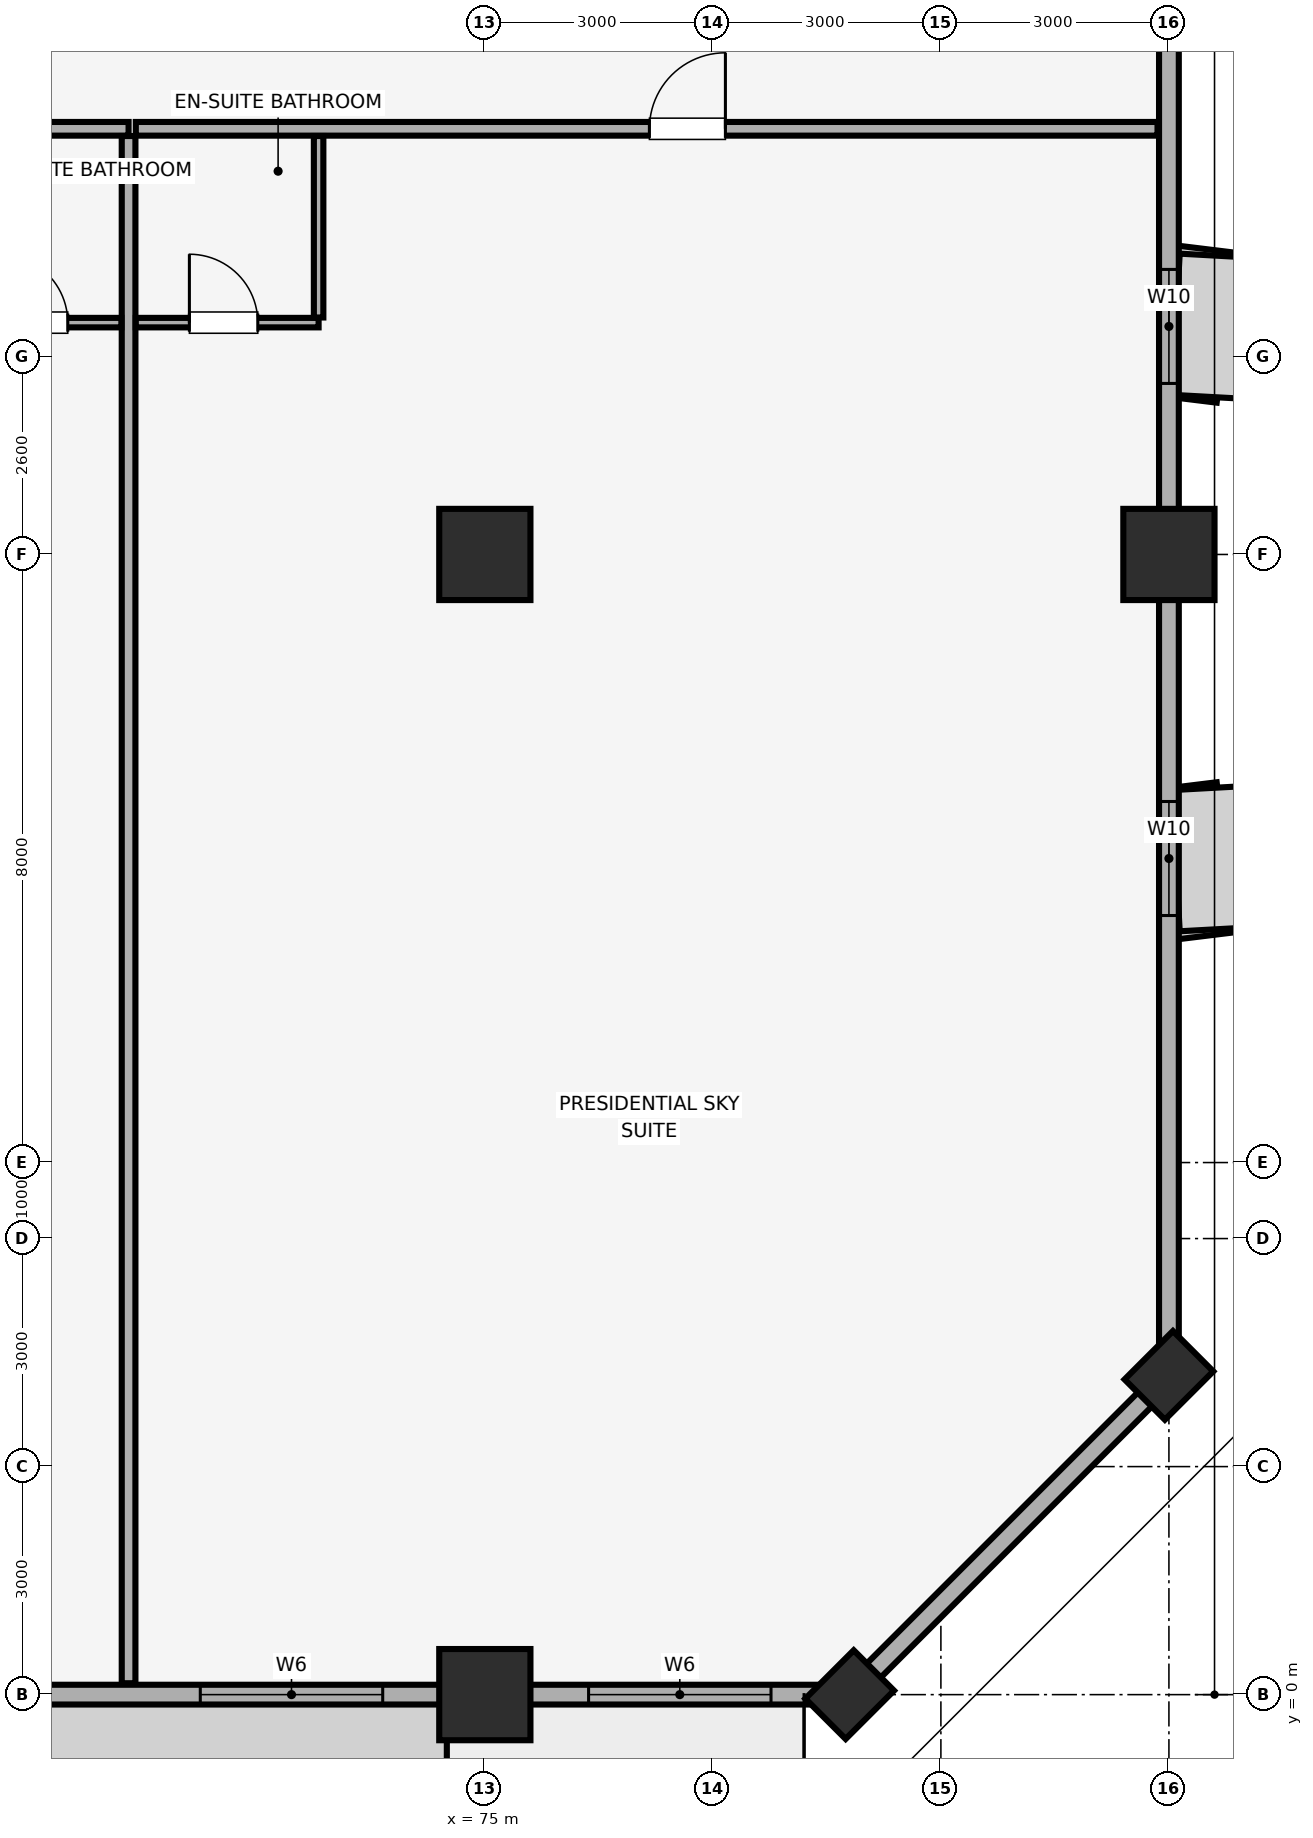
"""IFC4 building model, lengths in metres.
Left out: names, types, materials, properties, quantities, classifications, styles, units other than length and angle.
Written with IfcOpenShell. Run it as: python <this file> out.ifc"""

import sys

from ifc_helpers import new_model, si_unit, direction, frame, frame_2d, origin, origin_2d, place, context, subcontext, project, spatial, rectangle, extrude, element, fill, save


model = new_model("IFC4")
c1 = context("Model", 3, precision=1e-05, world=origin(), true_north=direction((0.0, 1.0)))
c2 = subcontext(c1, "Body", "Model", "MODEL_VIEW")
j1 = project(units=[si_unit("LENGTHUNIT", "METRE"), si_unit("PLANEANGLEUNIT", "RADIAN")], contexts=[c1])
p1 = place(None, origin())
s1 = spatial("IfcSite", under=j1, at=p1, CompositionType="ELEMENT")
p2 = place(p1, origin())
s2 = spatial("IfcBuilding", under=s1, at=p2, CompositionType="ELEMENT")
p3 = place(p2, frame((0.0, 0.0, 93.05)))
s3 = spatial("IfcBuildingStorey", under=s2, at=p3, CompositionType="ELEMENT", Elevation=93.05)
for number, where, z_axis, x_axis in (
    (1, (75.0, 0.0, 0.0), (0.0, 0.0, 1.0), (1.0, 0.0, 0.0)),
    (2, (84.0, 15.0, 0.0), (0.0, 0.0, 1.0), (1.0, 0.0, 0.0)),
):
    element("IfcColumn", number, at=place(p3, frame(where, z_axis=z_axis, x_axis=x_axis)), inside=s3, PredefinedType="COLUMN", context=c2, shape_type="SweptSolid", body=[
        extrude(rectangle(XDim=1.2, YDim=1.2, at=origin_2d()), origin(), (0.0, 0.0, 1.0), 3.51),
    ])
for number, where, z_axis, x_axis in (
    (3, (79.8, 0.0, 0.0), (0.0, 0.0, 1.0), (0.707, 0.707, 0.0)),
    (4, (84.0, 4.2, 0.0), (0.0, 0.0, 1.0), (0.707, 0.707, 0.0)),
):
    element("IfcColumn", number, at=place(p3, frame(where, z_axis=z_axis, x_axis=x_axis)), inside=s3, PredefinedType="PILASTER", context=c2, shape_type="SweptSolid", body=[
        extrude(rectangle(XDim=0.9, YDim=0.75, at=origin_2d()), origin(), (0.0, 0.0, 1.0), 3.51),
    ])
p4 = place(p3, frame((75.0, 15.0, 0.0), z_axis=(0.0, 0.0, 1.0), x_axis=(1.0, 0.0, 0.0)))
e5 = element("IfcColumn", 5, at=p4, inside=s3, PredefinedType="COLUMN", context=c2, shape_type="SweptSolid", body=[
    extrude(rectangle(XDim=1.2, YDim=1.2, at=origin_2d()), origin(), (0.0, 0.0, 1.0), 3.51),
])
p5 = place(p3, frame((4.2, 0.0, 0.0), z_axis=(0.0, 0.0, 1.0), x_axis=(1.0, 0.0, 0.0)))
e6 = element("IfcWall", 6, at=p5, inside=s3, PredefinedType="SOLIDWALL", context=c2, shape_type="SweptSolid", body=[
    extrude(rectangle(XDim=75.6, YDim=0.26, at=frame_2d((37.8, 0.0))), origin(), (0.0, 0.0, 1.0), 2.56),
])
p6 = place(p5, frame((21.383, 0.0, 0.0)))
e7 = element("IfcOpeningElement", 7, at=p6, cuts=e6, PredefinedType="OPENING", context=c2, shape_type="SweptSolid", body=[
    extrude(rectangle(XDim=1.1, YDim=2.15, at=frame_2d((0.55, 1.075))), frame((0.0, 0.14, 0.0), z_axis=(0.0, -1.0, 0.0), x_axis=(1.0, 0.0, 0.0)), (0.0, 0.0, 1.0), 0.28),
])
p7 = place(p5, frame((36.05, 0.0, 0.0)))
e8 = element("IfcOpeningElement", 8, at=p7, cuts=e6, PredefinedType="OPENING", context=c2, shape_type="SweptSolid", body=[
    extrude(rectangle(XDim=1.1, YDim=2.15, at=frame_2d((0.55, 1.075))), frame((0.0, 0.14, 0.0), z_axis=(0.0, -1.0, 0.0), x_axis=(1.0, 0.0, 0.0)), (0.0, 0.0, 1.0), 0.28),
])
p8 = place(p5, frame((53.117, 0.0, 0.0)))
e9 = element("IfcOpeningElement", 9, at=p8, cuts=e6, PredefinedType="OPENING", context=c2, shape_type="SweptSolid", body=[
    extrude(rectangle(XDim=1.1, YDim=2.15, at=frame_2d((0.55, 1.075))), frame((0.0, 0.14, 0.0), z_axis=(0.0, -1.0, 0.0), x_axis=(1.0, 0.0, 0.0)), (0.0, 0.0, 1.0), 0.28),
])
p9 = place(p5, frame((1.035, 0.0, 0.85)))
e10 = element("IfcOpeningElement", 10, at=p9, cuts=e6, PredefinedType="OPENING", context=c2, shape_type="SweptSolid", body=[
    extrude(rectangle(XDim=2.4, YDim=1.5, at=frame_2d((1.2, 0.75))), frame((0.0, 0.14, 0.0), z_axis=(0.0, -1.0, 0.0), x_axis=(1.0, 0.0, 0.0)), (0.0, 0.0, 1.0), 0.28),
])
p10 = place(p5, frame((6.244, 0.0, 0.85)))
e11 = element("IfcOpeningElement", 11, at=p10, cuts=e6, PredefinedType="OPENING", context=c2, shape_type="SweptSolid", body=[
    extrude(rectangle(XDim=2.4, YDim=1.5, at=frame_2d((1.2, 0.75))), frame((0.0, 0.14, 0.0), z_axis=(0.0, -1.0, 0.0), x_axis=(1.0, 0.0, 0.0)), (0.0, 0.0, 1.0), 0.28),
])
p11 = place(p5, frame((14.4, 0.0, 0.85)))
e12 = element("IfcOpeningElement", 12, at=p11, cuts=e6, PredefinedType="OPENING", context=c2, shape_type="SweptSolid", body=[
    extrude(rectangle(XDim=2.4, YDim=1.5, at=frame_2d((1.2, 0.75))), frame((0.0, 0.14, 0.0), z_axis=(0.0, -1.0, 0.0), x_axis=(1.0, 0.0, 0.0)), (0.0, 0.0, 1.0), 0.28),
])
p12 = place(p5, frame((23.127, 0.0, 0.85)))
e13 = element("IfcOpeningElement", 13, at=p12, cuts=e6, PredefinedType="OPENING", context=c2, shape_type="SweptSolid", body=[
    extrude(rectangle(XDim=2.4, YDim=1.5, at=frame_2d((1.2, 0.75))), frame((0.0, 0.14, 0.0), z_axis=(0.0, -1.0, 0.0), x_axis=(1.0, 0.0, 0.0)), (0.0, 0.0, 1.0), 0.28),
])
p13 = place(p5, frame((29.681, 0.0, 0.85)))
e14 = element("IfcOpeningElement", 14, at=p13, cuts=e6, PredefinedType="OPENING", context=c2, shape_type="SweptSolid", body=[
    extrude(rectangle(XDim=2.4, YDim=1.5, at=frame_2d((1.2, 0.75))), frame((0.0, 0.14, 0.0), z_axis=(0.0, -1.0, 0.0), x_axis=(1.0, 0.0, 0.0)), (0.0, 0.0, 1.0), 0.28),
])
p14 = place(p5, frame((38.601, 0.0, 0.85)))
e15 = element("IfcOpeningElement", 15, at=p14, cuts=e6, PredefinedType="OPENING", context=c2, shape_type="SweptSolid", body=[
    extrude(rectangle(XDim=2.4, YDim=1.5, at=frame_2d((1.2, 0.75))), frame((0.0, 0.14, 0.0), z_axis=(0.0, -1.0, 0.0), x_axis=(1.0, 0.0, 0.0)), (0.0, 0.0, 1.0), 0.28),
])
p15 = place(p5, frame((43.719, 0.0, 0.85)))
e16 = element("IfcOpeningElement", 16, at=p15, cuts=e6, PredefinedType="OPENING", context=c2, shape_type="SweptSolid", body=[
    extrude(rectangle(XDim=2.4, YDim=1.5, at=frame_2d((1.2, 0.75))), frame((0.0, 0.14, 0.0), z_axis=(0.0, -1.0, 0.0), x_axis=(1.0, 0.0, 0.0)), (0.0, 0.0, 1.0), 0.28),
])
p16 = place(p5, frame((50.073, 0.0, 0.85)))
e17 = element("IfcOpeningElement", 17, at=p16, cuts=e6, PredefinedType="OPENING", context=c2, shape_type="SweptSolid", body=[
    extrude(rectangle(XDim=2.4, YDim=1.5, at=frame_2d((1.2, 0.75))), frame((0.0, 0.14, 0.0), z_axis=(0.0, -1.0, 0.0), x_axis=(1.0, 0.0, 0.0)), (0.0, 0.0, 1.0), 0.28),
])
p17 = place(p5, frame((58.838, 0.0, 0.85)))
e18 = element("IfcOpeningElement", 18, at=p17, cuts=e6, PredefinedType="OPENING", context=c2, shape_type="SweptSolid", body=[
    extrude(rectangle(XDim=2.4, YDim=1.5, at=frame_2d((1.2, 0.75))), frame((0.0, 0.14, 0.0), z_axis=(0.0, -1.0, 0.0), x_axis=(1.0, 0.0, 0.0)), (0.0, 0.0, 1.0), 0.28),
])
p18 = place(p5, frame((67.056, 0.0, 0.85)))
e19 = element("IfcOpeningElement", 19, at=p18, cuts=e6, PredefinedType="OPENING", context=c2, shape_type="SweptSolid", body=[
    extrude(rectangle(XDim=2.4, YDim=1.5, at=frame_2d((1.2, 0.75))), frame((0.0, 0.14, 0.0), z_axis=(0.0, -1.0, 0.0), x_axis=(1.0, 0.0, 0.0)), (0.0, 0.0, 1.0), 0.28),
])
p19 = place(p5, frame((72.165, 0.0, 0.85)))
e20 = element("IfcOpeningElement", 20, at=p19, cuts=e6, PredefinedType="OPENING", context=c2, shape_type="SweptSolid", body=[
    extrude(rectangle(XDim=2.4, YDim=1.5, at=frame_2d((1.2, 0.75))), frame((0.0, 0.14, 0.0), z_axis=(0.0, -1.0, 0.0), x_axis=(1.0, 0.0, 0.0)), (0.0, 0.0, 1.0), 0.28),
])
p20 = place(p3, frame((79.8, 0.0, 0.0), z_axis=(0.0, 0.0, 1.0), x_axis=(0.707106781187, 0.707106781187, 0.0)))
e21 = element("IfcWall", 21, at=p20, inside=s3, PredefinedType="SOLIDWALL", context=c2, shape_type="SweptSolid", body=[
    extrude(rectangle(XDim=5.94, YDim=0.26, at=frame_2d((2.97, 0.0))), origin(), (0.0, 0.0, 1.0), 2.56),
])
p21 = place(p3, frame((84.0, 4.2, 0.0), z_axis=(0.0, 0.0, 1.0), x_axis=(0.0, 1.0, 0.0)))
e22 = element("IfcWall", 22, at=p21, inside=s3, PredefinedType="SOLIDWALL", context=c2, shape_type="SweptSolid", body=[
    extrude(rectangle(XDim=40.6, YDim=0.26, at=frame_2d((20.3, 0.0))), origin(), (0.0, 0.0, 1.0), 2.56),
])
p22 = place(p21, frame((6.05, 0.0, 0.85)))
e23 = element("IfcOpeningElement", 23, at=p22, cuts=e22, PredefinedType="OPENING", context=c2, shape_type="SweptSolid", body=[
    extrude(rectangle(XDim=1.5, YDim=1.4, at=frame_2d((0.75, 0.7))), frame((0.0, 0.14, 0.0), z_axis=(0.0, -1.0, 0.0), x_axis=(1.0, 0.0, 0.0)), (0.0, 0.0, 1.0), 0.28),
])
p23 = place(p21, frame((13.05, 0.0, 0.85)))
e24 = element("IfcOpeningElement", 24, at=p23, cuts=e22, PredefinedType="OPENING", context=c2, shape_type="SweptSolid", body=[
    extrude(rectangle(XDim=1.5, YDim=1.4, at=frame_2d((0.75, 0.7))), frame((0.0, 0.14, 0.0), z_axis=(0.0, -1.0, 0.0), x_axis=(1.0, 0.0, 0.0)), (0.0, 0.0, 1.0), 0.28),
])
p24 = place(p21, frame((20.775, 0.0, 0.85)))
e25 = element("IfcOpeningElement", 25, at=p24, cuts=e22, PredefinedType="OPENING", context=c2, shape_type="SweptSolid", body=[
    extrude(rectangle(XDim=1.5, YDim=1.4, at=frame_2d((0.75, 0.7))), frame((0.0, 0.14, 0.0), z_axis=(0.0, -1.0, 0.0), x_axis=(1.0, 0.0, 0.0)), (0.0, 0.0, 1.0), 0.28),
])
p25 = place(p21, frame((27.165, 0.0, 0.85)))
e26 = element("IfcOpeningElement", 26, at=p25, cuts=e22, PredefinedType="OPENING", context=c2, shape_type="SweptSolid", body=[
    extrude(rectangle(XDim=1.5, YDim=1.4, at=frame_2d((0.75, 0.7))), frame((0.0, 0.14, 0.0), z_axis=(0.0, -1.0, 0.0), x_axis=(1.0, 0.0, 0.0)), (0.0, 0.0, 1.0), 0.28),
])
p26 = place(p21, frame((31.935, 0.0, 0.85)))
e27 = element("IfcOpeningElement", 27, at=p26, cuts=e22, PredefinedType="OPENING", context=c2, shape_type="SweptSolid", body=[
    extrude(rectangle(XDim=1.5, YDim=1.4, at=frame_2d((0.75, 0.7))), frame((0.0, 0.14, 0.0), z_axis=(0.0, -1.0, 0.0), x_axis=(1.0, 0.0, 0.0)), (0.0, 0.0, 1.0), 0.28),
])
p27 = place(p21, frame((37.365, 0.0, 0.85)))
e28 = element("IfcOpeningElement", 28, at=p27, cuts=e22, PredefinedType="OPENING", context=c2, shape_type="SweptSolid", body=[
    extrude(rectangle(XDim=1.5, YDim=1.4, at=frame_2d((0.75, 0.7))), frame((0.0, 0.14, 0.0), z_axis=(0.0, -1.0, 0.0), x_axis=(1.0, 0.0, 0.0)), (0.0, 0.0, 1.0), 0.28),
])
p28 = place(p3, frame((61.171, 20.6, 0.0), z_axis=(0.0, 0.0, 1.0), x_axis=(1.0, 0.0, 0.0)))
e29 = element("IfcWall", 29, at=p28, inside=s3, PredefinedType="PARTITIONING", context=c2, shape_type="SweptSolid", body=[
    extrude(rectangle(XDim=9.142, YDim=0.18, at=frame_2d((4.571, 0.0))), origin(), (0.0, 0.0, 1.0), 3.51),
])
p29 = place(p28, frame((2.475, 0.0, 0.0)))
e30 = element("IfcOpeningElement", 30, at=p29, cuts=e29, PredefinedType="OPENING", context=c2, shape_type="SweptSolid", body=[
    extrude(rectangle(XDim=1.0, YDim=2.15, at=frame_2d((0.5, 1.075))), frame((0.0, 0.1, 0.0), z_axis=(0.0, -1.0, 0.0), x_axis=(1.0, 0.0, 0.0)), (0.0, 0.0, 1.0), 0.2),
])
p30 = place(p3, frame((70.313, 0.15, 0.0), z_axis=(0.0, 0.0, 1.0), x_axis=(0.0, 1.0, 0.0)))
e31 = element("IfcWall", 31, at=p30, inside=s3, PredefinedType="PARTITIONING", context=c2, shape_type="SweptSolid", body=[
    extrude(rectangle(XDim=20.355, YDim=0.18, at=frame_2d((10.177, 0.0))), origin(), (0.0, 0.0, 1.0), 3.51),
])
p31 = place(p3, frame((67.813, 18.05, 0.0), z_axis=(0.0, 0.0, 1.0), x_axis=(1.0, 0.0, 0.0)))
e32 = element("IfcWall", 32, at=p31, inside=s3, PredefinedType="PARTITIONING", context=c2, shape_type="SweptSolid", body=[
    extrude(rectangle(XDim=2.405, YDim=0.125, at=frame_2d((1.203, 0.0))), origin(), (0.0, 0.0, 1.0), 3.51),
])
p32 = place(p31, frame((0.8, 0.0, 0.0)))
e33 = element("IfcOpeningElement", 33, at=p32, cuts=e32, PredefinedType="OPENING", context=c2, shape_type="SweptSolid", body=[
    extrude(rectangle(XDim=0.9, YDim=2.1, at=frame_2d((0.45, 1.05))), frame((0.0, 0.073, 0.0), z_axis=(0.0, -1.0, 0.0), x_axis=(1.0, 0.0, 0.0)), (0.0, 0.0, 1.0), 0.145),
])
p33 = place(p3, frame((70.408, 20.6, 0.0), z_axis=(0.0, 0.0, 1.0), x_axis=(1.0, 0.0, 0.0)))
e34 = element("IfcWall", 34, at=p33, inside=s3, PredefinedType="PARTITIONING", context=c2, shape_type="SweptSolid", body=[
    extrude(rectangle(XDim=13.442, YDim=0.18, at=frame_2d((6.721, 0.0))), origin(), (0.0, 0.0, 1.0), 3.51),
])
p34 = place(p33, frame((6.757, 0.0, 0.0)))
e35 = element("IfcOpeningElement", 35, at=p34, cuts=e34, PredefinedType="OPENING", context=c2, shape_type="SweptSolid", body=[
    extrude(rectangle(XDim=1.0, YDim=2.15, at=frame_2d((0.5, 1.075))), frame((0.0, 0.1, 0.0), z_axis=(0.0, -1.0, 0.0), x_axis=(1.0, 0.0, 0.0)), (0.0, 0.0, 1.0), 0.2),
])
p35 = place(p3, frame((70.408, 18.05, 0.0), z_axis=(0.0, 0.0, 1.0), x_axis=(1.0, 0.0, 0.0)))
e36 = element("IfcWall", 36, at=p35, inside=s3, PredefinedType="PARTITIONING", context=c2, shape_type="SweptSolid", body=[
    extrude(rectangle(XDim=2.405, YDim=0.125, at=frame_2d((1.202, 0.0))), origin(), (0.0, 0.0, 1.0), 3.51),
])
p36 = place(p35, frame((0.705, 0.0, 0.0)))
e37 = element("IfcOpeningElement", 37, at=p36, cuts=e36, PredefinedType="OPENING", context=c2, shape_type="SweptSolid", body=[
    extrude(rectangle(XDim=0.9, YDim=2.1, at=frame_2d((0.45, 1.05))), frame((0.0, 0.073, 0.0), z_axis=(0.0, -1.0, 0.0), x_axis=(1.0, 0.0, 0.0)), (0.0, 0.0, 1.0), 0.145),
])
p37 = place(p3, frame((72.813, 18.117, 0.0), z_axis=(0.0, 0.0, 1.0), x_axis=(0.0, 1.0, 0.0)))
e38 = element("IfcWall", 38, at=p37, inside=s3, PredefinedType="PARTITIONING", context=c2, shape_type="SweptSolid", body=[
    extrude(rectangle(XDim=2.387, YDim=0.125, at=frame_2d((1.194, 0.0))), origin(), (0.0, 0.0, 1.0), 3.51),
])
p38 = place(p18, origin())
e39 = element("IfcWindow", 39, at=p38, inside=s3, PartitioningType="SINGLE_PANEL", PredefinedType="WINDOW", context=c2, shape_type="SweptSolid", body=[
    extrude(rectangle(XDim=2.4, YDim=1.5, at=frame_2d((1.2, 0.75))), frame((0.0, 0.03, 0.0), z_axis=(0.0, -1.0, 0.0), x_axis=(1.0, 0.0, 0.0)), (0.0, 0.0, 1.0), 0.06),
])
fill(e19, e39)
p39 = place(p19, origin())
e40 = element("IfcWindow", 40, at=p39, inside=s3, PartitioningType="SINGLE_PANEL", PredefinedType="WINDOW", context=c2, shape_type="SweptSolid", body=[
    extrude(rectangle(XDim=2.4, YDim=1.5, at=frame_2d((1.2, 0.75))), frame((0.0, 0.03, 0.0), z_axis=(0.0, -1.0, 0.0), x_axis=(1.0, 0.0, 0.0)), (0.0, 0.0, 1.0), 0.06),
])
fill(e20, e40)
p40 = place(p22, origin())
e41 = element("IfcWindow", 41, at=p40, inside=s3, PartitioningType="SINGLE_PANEL", PredefinedType="WINDOW", context=c2, shape_type="SweptSolid", body=[
    extrude(rectangle(XDim=1.5, YDim=1.4, at=frame_2d((0.75, 0.7))), frame((0.0, 0.03, 0.0), z_axis=(0.0, -1.0, 0.0), x_axis=(1.0, 0.0, 0.0)), (0.0, 0.0, 1.0), 0.06),
])
fill(e23, e41)
p41 = place(p23, origin())
e42 = element("IfcWindow", 42, at=p41, inside=s3, PartitioningType="SINGLE_PANEL", PredefinedType="WINDOW", context=c2, shape_type="SweptSolid", body=[
    extrude(rectangle(XDim=1.5, YDim=1.4, at=frame_2d((0.75, 0.7))), frame((0.0, 0.03, 0.0), z_axis=(0.0, -1.0, 0.0), x_axis=(1.0, 0.0, 0.0)), (0.0, 0.0, 1.0), 0.06),
])
fill(e24, e42)
p42 = place(p32, origin())
e43 = element("IfcDoor", 43, at=p42, inside=s3, OperationType="SINGLE_SWING_LEFT", PredefinedType="DOOR", context=c2, shape_type="SweptSolid", body=[
    extrude(rectangle(XDim=0.9, YDim=2.1, at=frame_2d((0.45, 1.05))), frame((0.0, 0.025, 0.0), z_axis=(0.0, -1.0, 0.0), x_axis=(1.0, 0.0, 0.0)), (0.0, 0.0, 1.0), 0.05),
])
fill(e33, e43)
p43 = place(p34, origin())
e44 = element("IfcDoor", 44, at=p43, inside=s3, OperationType="SINGLE_SWING_RIGHT", PredefinedType="DOOR", context=c2, shape_type="SweptSolid", body=[
    extrude(rectangle(XDim=1.0, YDim=2.15, at=frame_2d((0.5, 1.075))), frame((0.0, 0.025, 0.0), z_axis=(0.0, -1.0, 0.0), x_axis=(1.0, 0.0, 0.0)), (0.0, 0.0, 1.0), 0.05),
])
fill(e35, e44)
p44 = place(p36, origin())
e45 = element("IfcDoor", 45, at=p44, inside=s3, OperationType="SINGLE_SWING_LEFT", PredefinedType="DOOR", context=c2, shape_type="SweptSolid", body=[
    extrude(rectangle(XDim=0.9, YDim=2.1, at=frame_2d((0.45, 1.05))), frame((0.0, 0.025, 0.0), z_axis=(0.0, -1.0, 0.0), x_axis=(1.0, 0.0, 0.0)), (0.0, 0.0, 1.0), 0.05),
])
fill(e37, e45)
save(model, sys.argv[1])
